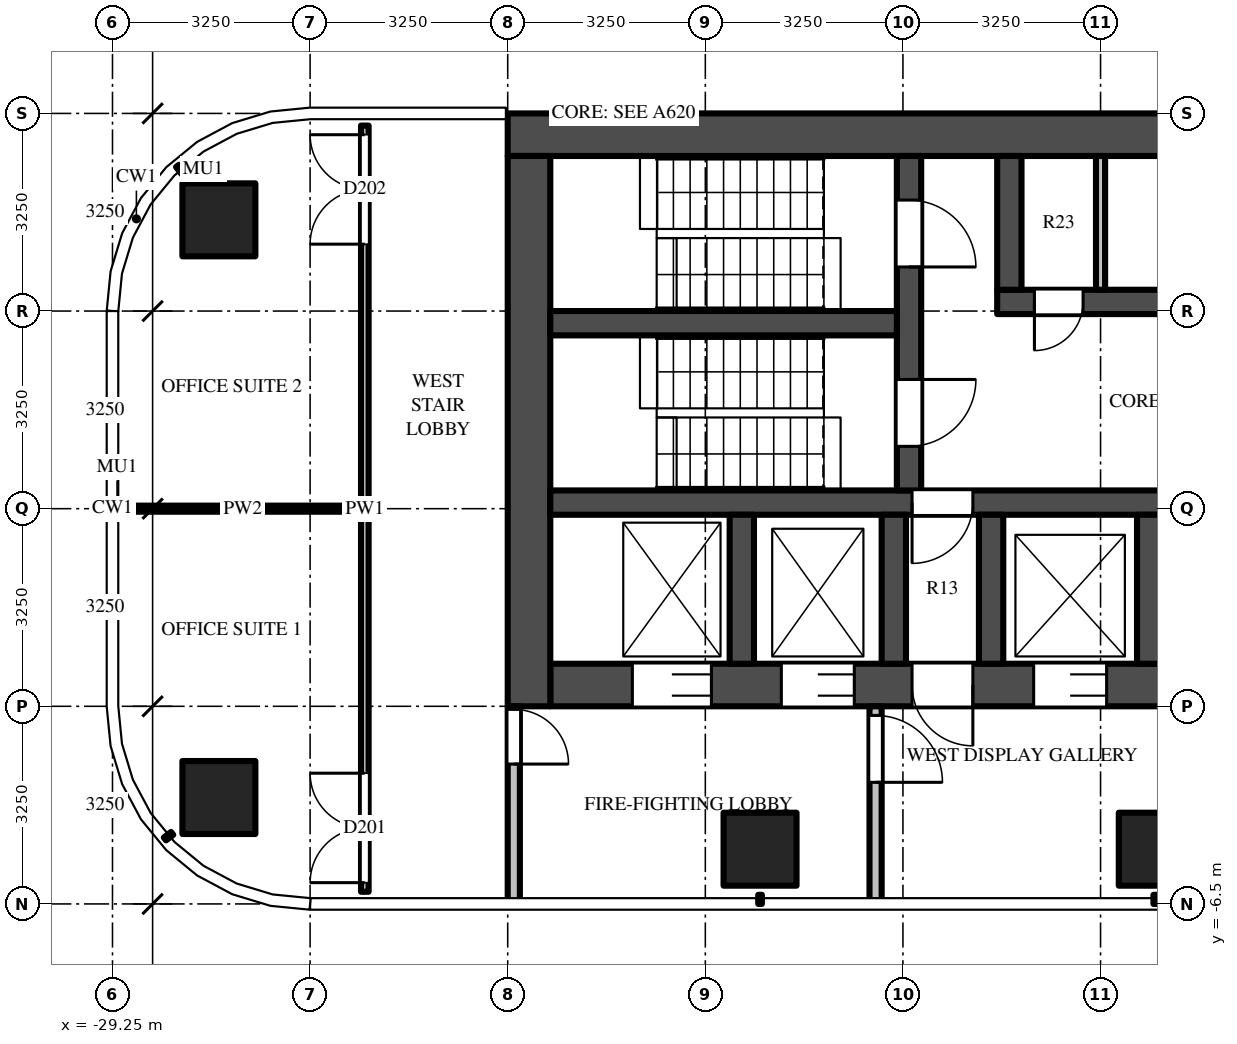
"""IFC4 building model, lengths in metres.
Left out: names, types, materials, properties, quantities, classifications, styles, units other than length and angle.
Written with IfcOpenShell. Run it as: python <this file> out.ifc"""

import sys

from ifc_helpers import new_model, si_unit, direction, frame, frame_2d, origin, origin_2d, place, context, subcontext, project, spatial, rectangle, extrude, source, transform, mapped, element, fill, save


model = new_model("IFC4")
c1 = context("Model", 3, precision=1e-05, world=origin(), true_north=direction((0.0, 1.0)))
c2 = subcontext(c1, "Body", "Model", "MODEL_VIEW")
j1 = project(units=[si_unit("LENGTHUNIT", "METRE"), si_unit("PLANEANGLEUNIT", "RADIAN")], contexts=[c1])
p1 = place(None, origin())
s1 = spatial("IfcSite", under=j1, at=p1, CompositionType="ELEMENT")
p2 = place(p1, origin())
s2 = spatial("IfcBuilding", under=s1, at=p2, CompositionType="ELEMENT")
p3 = place(p2, frame((0.0, 0.0, 169.8)))
s3 = spatial("IfcBuildingStorey", under=s2, at=p3, CompositionType="ELEMENT", Elevation=169.8)
m1 = source(origin(), c2, "Body", "SweptSolid", [
    extrude(rectangle(XDim=1.2, YDim=1.2, at=origin_2d()), origin(), (0.0, 0.0, 1.0), 3.9),
])
for number, where, z_axis, x_axis in (
    (1, (-12.1, -5.6, 0.0), (0.0, 0.0, 1.0), (1.0, 0.0, 0.0)),
    (2, (-18.6, -5.6, 0.0), (0.0, 0.0, 1.0), (1.0, 0.0, 0.0)),
    (3, (-27.5, -4.75, 0.0), (0.0, 0.0, 1.0), (1.0, 0.0, 0.0)),
    (4, (-27.5, 4.75, 0.0), (0.0, 0.0, 1.0), (1.0, 0.0, 0.0)),
):
    element("IfcColumn", number, at=place(p3, frame(where, z_axis=z_axis, x_axis=x_axis)), inside=s3, PredefinedType="COLUMN", context=c2, shape_type="MappedRepresentation", body=[
        mapped(m1, transform((0.0, 0.0, 0.0))),
    ])
m2 = source(origin(), c2, "Body", "SweptSolid", [
    extrude(rectangle(XDim=16.55, YDim=0.7, at=frame_2d((8.275, 0.0))), origin(), (0.0, 0.0, 1.0), 3.7),
])
p4 = place(p3, frame((-6.2, 6.15, 0.0), z_axis=(0.0, 0.0, 1.0), x_axis=(-1.0, 0.0, 0.0)))
e5 = element("IfcWall", 5, at=p4, inside=s3, PredefinedType="SHEAR", context=c2, shape_type="MappedRepresentation", body=[
    mapped(m2, transform((0.0, 0.0, 0.0))),
])
m3 = source(origin(), c2, "Body", "SweptSolid", [
    extrude(rectangle(XDim=14.85, YDim=0.7, at=frame_2d((7.425, 0.0))), origin(), (0.0, 0.0, 1.0), 3.7),
])
p5 = place(p3, frame((-7.2, -2.9, 0.0), z_axis=(0.0, 0.0, 1.0), x_axis=(-1.0, 0.0, 0.0)))
e6 = element("IfcWall", 6, at=p5, inside=s3, PredefinedType="SHEAR", context=c2, shape_type="MappedRepresentation", body=[
    mapped(m3, transform((0.0, 0.0, 0.0))),
])
m4 = source(origin(), c2, "Body", "SweptSolid", [
    extrude(rectangle(XDim=1.1, YDim=2.1, at=frame_2d((0.55, 1.05))), frame((0.0, 0.36, 0.0), z_axis=(0.0, -1.0, 0.0), x_axis=(1.0, 0.0, 0.0)), (0.0, 0.0, 1.0), 0.72),
])
p6 = place(p5, frame((0.55, 0.0, 0.0)))
e7 = element("IfcOpeningElement", 7, at=p6, cuts=e6, PredefinedType="OPENING", context=c2, shape_type="MappedRepresentation", body=[
    mapped(m4, transform((0.0, 0.0, 0.0))),
])
p7 = place(p5, frame((3.15, 0.0, 0.0)))
e8 = element("IfcOpeningElement", 8, at=p7, cuts=e6, PredefinedType="OPENING", context=c2, shape_type="MappedRepresentation", body=[
    mapped(m4, transform((0.0, 0.0, 0.0))),
])
m5 = source(origin(), c2, "Body", "SweptSolid", [
    extrude(rectangle(XDim=1.2, YDim=2.1, at=frame_2d((0.6, 1.05))), frame((0.0, 0.36, 0.0), z_axis=(0.0, -1.0, 0.0), x_axis=(1.0, 0.0, 0.0)), (0.0, 0.0, 1.0), 0.72),
])
p8 = place(p5, frame((5.7, 0.0, 0.0)))
e9 = element("IfcOpeningElement", 9, at=p8, cuts=e6, PredefinedType="OPENING", context=c2, shape_type="MappedRepresentation", body=[
    mapped(m5, transform((0.0, 0.0, 0.0))),
])
m6 = source(origin(), c2, "Body", "SweptSolid", [
    extrude(rectangle(XDim=1.3, YDim=2.1, at=frame_2d((0.65, 1.05))), frame((0.0, 0.36, 0.0), z_axis=(0.0, -1.0, 0.0), x_axis=(1.0, 0.0, 0.0)), (0.0, 0.0, 1.0), 0.72),
])
p9 = place(p5, frame((12.2, 0.0, 0.0)))
e10 = element("IfcOpeningElement", 10, at=p9, cuts=e6, PredefinedType="OPENING", context=c2, shape_type="MappedRepresentation", body=[
    mapped(m6, transform((0.0, 0.0, 0.0))),
])
p10 = place(p5, frame((9.85, 0.0, 0.0)))
e11 = element("IfcOpeningElement", 11, at=p10, cuts=e6, PredefinedType="OPENING", context=c2, shape_type="MappedRepresentation", body=[
    mapped(m5, transform((0.0, 0.0, 0.0))),
])
m7 = source(origin(), c2, "Body", "SweptSolid", [
    extrude(rectangle(XDim=1.0, YDim=2.1, at=frame_2d((0.5, 1.05))), frame((0.0, 0.36, 0.0), z_axis=(0.0, -1.0, 0.0), x_axis=(1.0, 0.0, 0.0)), (0.0, 0.0, 1.0), 0.72),
])
p11 = place(p5, frame((7.9, 0.0, 0.0)))
e12 = element("IfcOpeningElement", 12, at=p11, cuts=e6, PredefinedType="OPENING", context=c2, shape_type="MappedRepresentation", body=[
    mapped(m7, transform((0.0, 0.0, 0.0))),
])
m8 = source(origin(), c2, "Body", "SweptSolid", [
    extrude(rectangle(XDim=9.05, YDim=0.7, at=frame_2d((4.525, 0.0))), origin(), (0.0, 0.0, 1.0), 3.7),
])
p12 = place(p3, frame((-22.4, 5.8, 0.0), z_axis=(0.0, 0.0, 1.0), x_axis=(0.0, -1.0, 0.0)))
e13 = element("IfcWall", 13, at=p12, inside=s3, PredefinedType="SHEAR", context=c2, shape_type="MappedRepresentation", body=[
    mapped(m8, transform((0.0, 0.0, 0.0))),
])
m9 = source(origin(), c2, "Body", "SweptSolid", [
    extrude(rectangle(XDim=7.5, YDim=0.4, at=frame_2d((3.75, 0.0))), origin(), (0.0, 0.0, 1.0), 3.7),
])
p13 = place(p3, frame((-7.2, 3.4, 0.0), z_axis=(0.0, 0.0, 1.0), x_axis=(-1.0, 0.0, 0.0)))
e14 = element("IfcWall", 14, at=p13, inside=s3, PredefinedType="SHEAR", context=c2, shape_type="MappedRepresentation", body=[
    mapped(m9, transform((0.0, 0.0, 0.0))),
])
m10 = source(origin(), c2, "Body", "SweptSolid", [
    extrude(rectangle(XDim=1.0, YDim=2.1, at=frame_2d((0.5, 1.05))), frame((0.0, 0.21, 0.0), z_axis=(0.0, -1.0, 0.0), x_axis=(1.0, 0.0, 0.0)), (0.0, 0.0, 1.0), 0.42),
])
p14 = place(p13, frame((2.363, 0.0, 0.0)))
e15 = element("IfcOpeningElement", 15, at=p14, cuts=e14, PredefinedType="OPENING", context=c2, shape_type="MappedRepresentation", body=[
    mapped(m10, transform((0.0, 0.0, 0.0))),
])
m11 = source(origin(), c2, "Body", "SweptSolid", [
    extrude(rectangle(XDim=0.8, YDim=2.1, at=frame_2d((0.4, 1.05))), frame((0.0, 0.21, 0.0), z_axis=(0.0, -1.0, 0.0), x_axis=(1.0, 0.0, 0.0)), (0.0, 0.0, 1.0), 0.42),
])
p15 = place(p13, frame((6.087, 0.0, 0.0)))
e16 = element("IfcOpeningElement", 16, at=p15, cuts=e14, PredefinedType="OPENING", context=c2, shape_type="MappedRepresentation", body=[
    mapped(m11, transform((0.0, 0.0, 0.0))),
])
m12 = source(origin(), c2, "Body", "SweptSolid", [
    extrude(rectangle(XDim=14.85, YDim=0.4, at=frame_2d((7.425, 0.0))), origin(), (0.0, 0.0, 1.0), 3.7),
])
p16 = place(p3, frame((-7.2, 0.1, 0.0), z_axis=(0.0, 0.0, 1.0), x_axis=(-1.0, 0.0, 0.0)))
e17 = element("IfcWall", 17, at=p16, inside=s3, PredefinedType="SHEAR", context=c2, shape_type="MappedRepresentation", body=[
    mapped(m12, transform((0.0, 0.0, 0.0))),
])
p17 = place(p16, frame((7.9, 0.0, 0.0)))
e18 = element("IfcOpeningElement", 18, at=p17, cuts=e17, PredefinedType="OPENING", context=c2, shape_type="MappedRepresentation", body=[
    mapped(m10, transform((0.0, 0.0, 0.0))),
])
m13 = source(origin(), c2, "Body", "SweptSolid", [
    extrude(rectangle(XDim=5.5, YDim=0.4, at=frame_2d((2.75, 0.0))), origin(), (0.0, 0.0, 1.0), 3.7),
])
p18 = place(p3, frame((-16.15, 5.8, 0.0), z_axis=(0.0, 0.0, 1.0), x_axis=(0.0, -1.0, 0.0)))
e19 = element("IfcWall", 19, at=p18, inside=s3, PredefinedType="SHEAR", context=c2, shape_type="MappedRepresentation", body=[
    mapped(m13, transform((0.0, 0.0, 0.0))),
])
m14 = source(origin(), c2, "Body", "SweptSolid", [
    extrude(rectangle(XDim=1.1, YDim=2.1, at=frame_2d((0.55, 1.05))), frame((0.0, 0.21, 0.0), z_axis=(0.0, -1.0, 0.0), x_axis=(1.0, 0.0, 0.0)), (0.0, 0.0, 1.0), 0.42),
])
p19 = place(p18, frame((0.725, 0.0, 0.0)))
e20 = element("IfcOpeningElement", 20, at=p19, cuts=e19, PredefinedType="OPENING", context=c2, shape_type="MappedRepresentation", body=[
    mapped(m14, transform((0.0, 0.0, 0.0))),
])
p20 = place(p18, frame((3.675, 0.0, 0.0)))
e21 = element("IfcOpeningElement", 21, at=p20, cuts=e19, PredefinedType="OPENING", context=c2, shape_type="MappedRepresentation", body=[
    mapped(m14, transform((0.0, 0.0, 0.0))),
])
m15 = source(origin(), c2, "Body", "SweptSolid", [
    extrude(rectangle(XDim=5.7, YDim=0.4, at=frame_2d((2.85, 0.0))), origin(), (0.0, 0.0, 1.0), 3.7),
])
p21 = place(p3, frame((-16.35, 3.05, 0.0), z_axis=(0.0, 0.0, 1.0), x_axis=(-1.0, 0.0, 0.0)))
e22 = element("IfcWall", 22, at=p21, inside=s3, PredefinedType="SHEAR", context=c2, shape_type="MappedRepresentation", body=[
    mapped(m15, transform((0.0, 0.0, 0.0))),
])
m16 = source(origin(), c2, "Body", "SweptSolid", [
    extrude(rectangle(XDim=2.2, YDim=0.4, at=frame_2d((1.1, 0.0))), origin(), (0.0, 0.0, 1.0), 3.7),
])
p22 = place(p3, frame((-14.5, 5.8, 0.0), z_axis=(0.0, 0.0, 1.0), x_axis=(0.0, -1.0, 0.0)))
e23 = element("IfcWall", 23, at=p22, inside=s3, PredefinedType="SHEAR", context=c2, shape_type="MappedRepresentation", body=[
    mapped(m16, transform((0.0, 0.0, 0.0))),
])
m17 = source(origin(), c2, "Body", "SweptSolid", [
    extrude(rectangle(XDim=2.45, YDim=0.4, at=frame_2d((1.225, 0.0))), origin(), (0.0, 0.0, 1.0), 3.7),
])
for number, where, z_axis, x_axis in (
    (24, (-12.2, -0.1, 0.0), (0.0, 0.0, 1.0), (0.0, -1.0, 0.0)),
    (25, (-14.8, -0.1, 0.0), (0.0, 0.0, 1.0), (0.0, -1.0, 0.0)),
    (26, (-16.4, -0.1, 0.0), (0.0, 0.0, 1.0), (0.0, -1.0, 0.0)),
    (27, (-18.9, -0.1, 0.0), (0.0, 0.0, 1.0), (0.0, -1.0, 0.0)),
):
    element("IfcWall", number, at=place(p3, frame(where, z_axis=z_axis, x_axis=x_axis)), inside=s3, PredefinedType="SHEAR", context=c2, shape_type="MappedRepresentation", body=[
        mapped(m17, transform((0.0, 0.0, 0.0))),
    ])
m18 = source(origin(), c2, "Body", "SweptSolid", [
    extrude(rectangle(XDim=3.25, YDim=0.2, at=frame_2d((1.625, 0.0))), origin(), (0.0, 0.0, 1.0), 3.7),
])
p23 = place(p3, frame((-16.7, -3.25, 0.0), z_axis=(0.0, 0.0, 1.0), x_axis=(0.0, -1.0, 0.0)))
e28 = element("IfcWall", 28, at=p23, inside=s3, PredefinedType="PARTITIONING", context=c2, shape_type="MappedRepresentation", body=[
    mapped(m18, transform((0.0, 0.0, 0.0))),
])
m19 = source(origin(), c2, "Body", "SweptSolid", [
    extrude(rectangle(XDim=1.1, YDim=2.1, at=frame_2d((0.55, 1.05))), frame((0.0, 0.11, 0.0), z_axis=(0.0, -1.0, 0.0), x_axis=(1.0, 0.0, 0.0)), (0.0, 0.0, 1.0), 0.22),
])
p24 = place(p23, frame((0.15, 0.0, 0.0)))
e29 = element("IfcOpeningElement", 29, at=p24, cuts=e28, PredefinedType="OPENING", context=c2, shape_type="MappedRepresentation", body=[
    mapped(m19, transform((0.0, 0.0, 0.0))),
])
p25 = place(p3, frame((-22.65, -3.25, 0.0), z_axis=(0.0, 0.0, 1.0), x_axis=(0.0, -1.0, 0.0)))
e30 = element("IfcWall", 30, at=p25, inside=s3, PredefinedType="PARTITIONING", context=c2, shape_type="MappedRepresentation", body=[
    mapped(m18, transform((0.0, 0.0, 0.0))),
])
m20 = source(origin(), c2, "Body", "SweptSolid", [
    extrude(rectangle(XDim=0.9, YDim=2.1, at=frame_2d((0.45, 1.05))), frame((0.0, 0.11, 0.0), z_axis=(0.0, -1.0, 0.0), x_axis=(1.0, 0.0, 0.0)), (0.0, 0.0, 1.0), 0.22),
])
p26 = place(p25, frame((0.05, 0.0, 0.0)))
e31 = element("IfcOpeningElement", 31, at=p26, cuts=e30, PredefinedType="OPENING", context=c2, shape_type="MappedRepresentation", body=[
    mapped(m20, transform((0.0, 0.0, 0.0))),
])
m21 = source(origin(), c2, "Body", "SweptSolid", [
    extrude(rectangle(XDim=2.2, YDim=0.15, at=frame_2d((1.1, 0.0))), origin(), (0.0, 0.0, 1.0), 3.7),
])
p27 = place(p3, frame((-13.0, 5.8, 0.0), z_axis=(0.0, 0.0, 1.0), x_axis=(0.0, -1.0, 0.0)))
e32 = element("IfcWall", 32, at=p27, inside=s3, PredefinedType="PARTITIONING", context=c2, shape_type="MappedRepresentation", body=[
    mapped(m21, transform((0.0, 0.0, 0.0))),
])
m22 = source(origin(), c2, "Body", "SweptSolid", [
    extrude(rectangle(XDim=12.6, YDim=0.125, at=frame_2d((6.3, 0.0))), origin(), (0.0, 0.0, 1.0), 2.78),
])
p28 = place(p3, frame((-25.1, -6.3, 0.0), z_axis=(0.0, 0.0, 1.0), x_axis=(0.0, 1.0, 0.0)))
e33 = element("IfcWall", 33, at=p28, inside=s3, PredefinedType="PARTITIONING", context=c2, shape_type="MappedRepresentation", body=[
    mapped(m22, transform((0.0, 0.0, 0.0))),
])
m23 = source(origin(), c2, "Body", "SweptSolid", [
    extrude(rectangle(XDim=1.8, YDim=2.1, at=frame_2d((0.9, 1.05))), frame((0.0, 0.073, 0.0), z_axis=(0.0, -1.0, 0.0), x_axis=(1.0, 0.0, 0.0)), (0.0, 0.0, 1.0), 0.145),
])
p29 = place(p28, frame((0.15, 0.0, 0.0)))
e34 = element("IfcOpeningElement", 34, at=p29, cuts=e33, PredefinedType="OPENING", context=c2, shape_type="MappedRepresentation", body=[
    mapped(m23, transform((0.0, 0.0, 0.0))),
])
p30 = place(p28, frame((10.65, 0.0, 0.0)))
e35 = element("IfcOpeningElement", 35, at=p30, cuts=e33, PredefinedType="OPENING", context=c2, shape_type="MappedRepresentation", body=[
    mapped(m23, transform((0.0, 0.0, 0.0))),
])
m24 = source(origin(), c2, "Body", "SweptSolid", [
    extrude(rectangle(XDim=3.887, YDim=0.1, at=frame_2d((1.944, 0.0))), origin(), (0.0, 0.0, 1.0), 2.78),
])
p31 = place(p3, frame((-29.05, 0.0, 0.0), z_axis=(0.0, 0.0, 1.0), x_axis=(1.0, 0.0, 0.0)))
e36 = element("IfcWall", 36, at=p31, inside=s3, PredefinedType="PARTITIONING", context=c2, shape_type="MappedRepresentation", body=[
    mapped(m24, transform((0.0, 0.0, 0.0))),
])
m25 = source(origin(), c2, "Body", "SweptSolid", [
    extrude(rectangle(XDim=1.2, YDim=2.1, at=frame_2d((0.6, 1.05))), frame((0.0, -0.275, 0.0), z_axis=(0.0, -1.0, 0.0), x_axis=(1.0, 0.0, 0.0)), (0.0, 0.0, 1.0), 0.05),
])
p32 = place(p8, origin())
e37 = element("IfcDoor", 37, at=p32, inside=s3, OperationType="DOUBLE_DOOR_SLIDING", PredefinedType="DOOR", context=c2, shape_type="MappedRepresentation", body=[
    mapped(m25, transform((0.0, 0.0, 0.0))),
])
fill(e9, e37)
m26 = source(origin(), c2, "Body", "SweptSolid", [
    extrude(rectangle(XDim=1.3, YDim=2.1, at=frame_2d((0.65, 1.05))), frame((0.0, -0.275, 0.0), z_axis=(0.0, -1.0, 0.0), x_axis=(1.0, 0.0, 0.0)), (0.0, 0.0, 1.0), 0.05),
])
p33 = place(p9, origin())
e38 = element("IfcDoor", 38, at=p33, inside=s3, OperationType="DOUBLE_DOOR_SLIDING", PredefinedType="DOOR", context=c2, shape_type="MappedRepresentation", body=[
    mapped(m26, transform((0.0, 0.0, 0.0))),
])
fill(e10, e38)
p34 = place(p10, origin())
e39 = element("IfcDoor", 39, at=p34, inside=s3, OperationType="DOUBLE_DOOR_SLIDING", PredefinedType="DOOR", context=c2, shape_type="MappedRepresentation", body=[
    mapped(m25, transform((0.0, 0.0, 0.0))),
])
fill(e11, e39)
m27 = source(origin(), c2, "Body", "SweptSolid", [
    extrude(rectangle(XDim=1.1, YDim=2.1, at=frame_2d((0.55, 1.05))), frame((0.0, 0.025, 0.0), z_axis=(0.0, -1.0, 0.0), x_axis=(1.0, 0.0, 0.0)), (0.0, 0.0, 1.0), 0.05),
])
p35 = place(p19, origin())
e40 = element("IfcDoor", 40, at=p35, inside=s3, OperationType="SINGLE_SWING_RIGHT", PredefinedType="DOOR", context=c2, shape_type="MappedRepresentation", body=[
    mapped(m27, transform((0.0, 0.0, 0.0))),
])
fill(e20, e40)
p36 = place(p20, origin())
e41 = element("IfcDoor", 41, at=p36, inside=s3, OperationType="SINGLE_SWING_LEFT", PredefinedType="DOOR", context=c2, shape_type="MappedRepresentation", body=[
    mapped(m27, transform((0.0, 0.0, 0.0))),
])
fill(e21, e41)
m28 = source(origin(), c2, "Body", "SweptSolid", [
    extrude(rectangle(XDim=1.0, YDim=2.1, at=frame_2d((0.5, 1.05))), frame((0.0, 0.025, 0.0), z_axis=(0.0, -1.0, 0.0), x_axis=(1.0, 0.0, 0.0)), (0.0, 0.0, 1.0), 0.05),
])
p37 = place(p17, origin())
e42 = element("IfcDoor", 42, at=p37, inside=s3, OperationType="SINGLE_SWING_RIGHT", PredefinedType="DOOR", context=c2, shape_type="MappedRepresentation", body=[
    mapped(m28, transform((0.0, 0.0, 0.0))),
])
fill(e18, e42)
m29 = source(origin(), c2, "Body", "SweptSolid", [
    extrude(rectangle(XDim=1.0, YDim=2.1, at=frame_2d((0.5, 1.05))), frame((0.0, -0.275, 0.0), z_axis=(0.0, -1.0, 0.0), x_axis=(1.0, 0.0, 0.0)), (0.0, 0.0, 1.0), 0.05),
])
p38 = place(p11, origin())
e43 = element("IfcDoor", 43, at=p38, inside=s3, OperationType="SINGLE_SWING_LEFT", PredefinedType="DOOR", context=c2, shape_type="MappedRepresentation", body=[
    mapped(m29, transform((0.0, 0.0, 0.0))),
])
fill(e12, e43)
p39 = place(p24, origin())
e44 = element("IfcDoor", 44, at=p39, inside=s3, OperationType="SINGLE_SWING_RIGHT", PredefinedType="DOOR", context=c2, shape_type="MappedRepresentation", body=[
    mapped(m27, transform((0.0, 0.0, 0.0))),
])
fill(e29, e44)
m30 = source(origin(), c2, "Body", "SweptSolid", [
    extrude(rectangle(XDim=0.9, YDim=2.1, at=frame_2d((0.45, 1.05))), frame((0.0, 0.025, 0.0), z_axis=(0.0, -1.0, 0.0), x_axis=(1.0, 0.0, 0.0)), (0.0, 0.0, 1.0), 0.05),
])
p40 = place(p26, origin())
e45 = element("IfcDoor", 45, at=p40, inside=s3, OperationType="SINGLE_SWING_RIGHT", PredefinedType="DOOR", context=c2, shape_type="MappedRepresentation", body=[
    mapped(m30, transform((0.0, 0.0, 0.0))),
])
fill(e31, e45)
m31 = source(origin(), c2, "Body", "SweptSolid", [
    extrude(rectangle(XDim=0.8, YDim=2.1, at=frame_2d((0.4, 1.05))), frame((0.0, 0.025, 0.0), z_axis=(0.0, -1.0, 0.0), x_axis=(1.0, 0.0, 0.0)), (0.0, 0.0, 1.0), 0.05),
])
p41 = place(p15, origin())
e46 = element("IfcDoor", 46, at=p41, inside=s3, OperationType="SINGLE_SWING_RIGHT", PredefinedType="DOOR", context=c2, shape_type="MappedRepresentation", body=[
    mapped(m31, transform((0.0, 0.0, 0.0))),
])
fill(e16, e46)
m32 = source(origin(), c2, "Body", "SweptSolid", [
    extrude(rectangle(XDim=1.8, YDim=2.1, at=frame_2d((0.9, 1.05))), frame((0.0, 0.025, 0.0), z_axis=(0.0, -1.0, 0.0), x_axis=(1.0, 0.0, 0.0)), (0.0, 0.0, 1.0), 0.05),
])
p42 = place(p29, origin())
e47 = element("IfcDoor", 47, at=p42, inside=s3, OperationType="DOUBLE_DOOR_SINGLE_SWING", PredefinedType="DOOR", context=c2, shape_type="MappedRepresentation", body=[
    mapped(m32, transform((0.0, 0.0, 0.0))),
])
fill(e34, e47)
p43 = place(p30, origin())
e48 = element("IfcDoor", 48, at=p43, inside=s3, OperationType="DOUBLE_DOOR_SINGLE_SWING", PredefinedType="DOOR", context=c2, shape_type="MappedRepresentation", body=[
    mapped(m32, transform((0.0, 0.0, 0.0))),
])
fill(e35, e48)
save(model, sys.argv[1])
